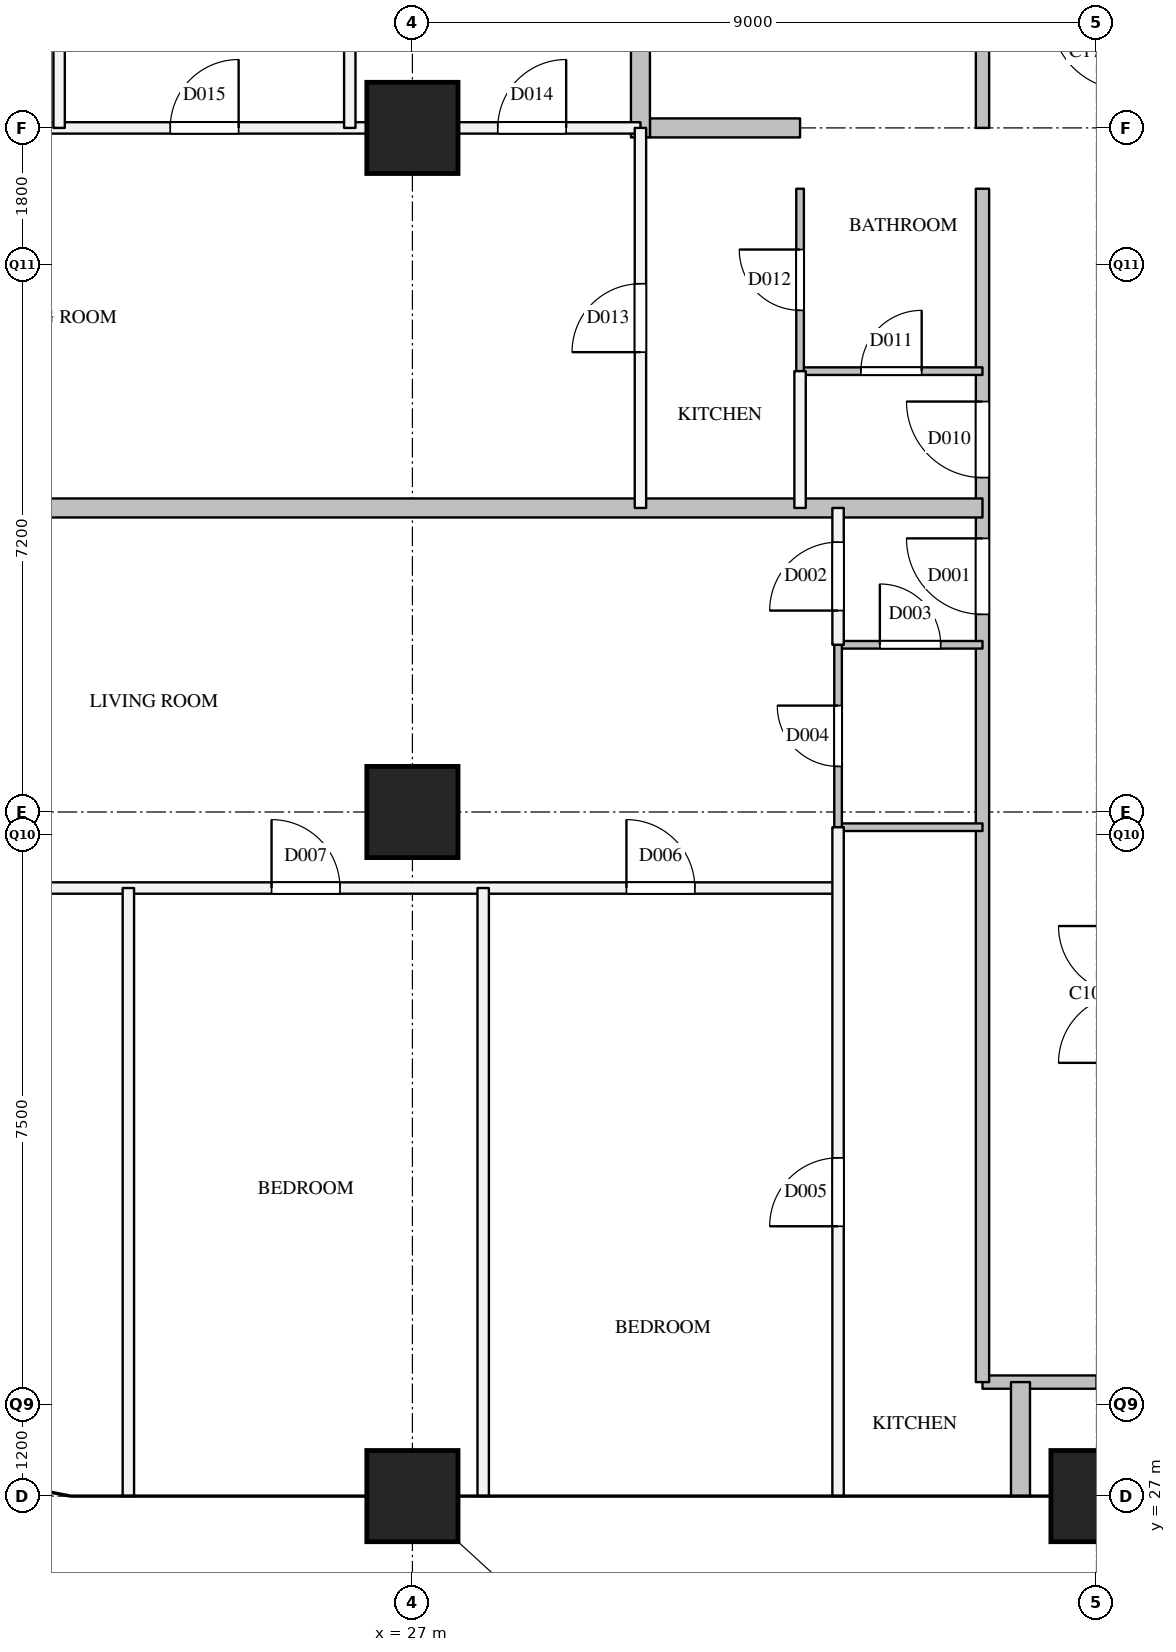
"""IFC4 building model, lengths in metres.
Left out: names, types, materials, properties, quantities, classifications, styles, units other than length and angle.
Written with IfcOpenShell. Run it as: python <this file> out.ifc"""

import sys

from ifc_helpers import new_model, si_unit, direction, frame, frame_2d, origin, origin_2d, place, context, subcontext, project, spatial, rectangle, extrude, element, fill, save


model = new_model("IFC4")
c1 = context("Model", 3, precision=1e-05, world=origin(), true_north=direction((0.0, 1.0)))
c2 = subcontext(c1, "Body", "Model", "MODEL_VIEW")
j1 = project(units=[si_unit("LENGTHUNIT", "METRE"), si_unit("PLANEANGLEUNIT", "RADIAN")], contexts=[c1])
p1 = place(None, origin())
s1 = spatial("IfcSite", under=j1, at=p1, CompositionType="ELEMENT")
p2 = place(p1, origin())
s2 = spatial("IfcBuilding", under=s1, at=p2, CompositionType="ELEMENT")
p3 = place(p2, frame((0.0, 0.0, 250.1)))
s3 = spatial("IfcBuildingStorey", under=s2, at=p3, CompositionType="ELEMENT", Elevation=250.1)
for number, where, z_axis, x_axis in (
    (1, (27.0, 27.0, 0.0), (0.0, 0.0, 1.0), (1.0, 0.0, 0.0)),
    (2, (27.0, 36.0, 0.0), (0.0, 0.0, 1.0), (1.0, 0.0, 0.0)),
    (3, (27.0, 45.0, 0.0), (0.0, 0.0, 1.0), (1.0, 0.0, 0.0)),
    (4, (36.0, 27.0, 0.0), (0.0, 0.0, 1.0), (1.0, 0.0, 0.0)),
):
    element("IfcColumn", number, at=place(p3, frame(where, z_axis=z_axis, x_axis=x_axis)), inside=s3, PredefinedType="COLUMN", context=c2, shape_type="SweptSolid", body=[
        extrude(rectangle(XDim=1.2, YDim=1.2, at=origin_2d()), origin(), (0.0, 0.0, 1.0), 3.9),
    ])
p4 = place(p3, frame((34.5, 28.5, 0.0), z_axis=(0.0, 0.0, 1.0), x_axis=(1.0, 0.0, 0.0)))
e5 = element("IfcWall", 5, at=p4, inside=s3, PredefinedType="PARTITIONING", context=c2, shape_type="SweptSolid", body=[
    extrude(rectangle(XDim=1.5, YDim=0.175, at=frame_2d((0.75, 0.0))), origin(), (0.0, 0.0, 1.0), 3.6),
])
p5 = place(p3, frame((34.5, 28.5, 0.0), z_axis=(0.0, 0.0, 1.0), x_axis=(0.0, 1.0, 0.0)))
e6 = element("IfcWall", 6, at=p5, inside=s3, PredefinedType="PARTITIONING", context=c2, shape_type="SweptSolid", body=[
    extrude(rectangle(XDim=15.7, YDim=0.175, at=frame_2d((7.85, 0.0))), origin(), (0.0, 0.0, 1.0), 3.6),
])
p6 = place(p5, frame((10.1, 0.0, 0.0)))
e7 = element("IfcOpeningElement", 7, at=p6, cuts=e6, PredefinedType="OPENING", context=c2, shape_type="SweptSolid", body=[
    extrude(rectangle(XDim=1.0, YDim=2.1, at=frame_2d((0.5, 1.05))), frame((0.0, 0.097, 0.0), z_axis=(0.0, -1.0, 0.0), x_axis=(1.0, 0.0, 0.0)), (0.0, 0.0, 1.0), 0.195),
])
p7 = place(p5, frame((11.9, 0.0, 0.0)))
e8 = element("IfcOpeningElement", 8, at=p7, cuts=e6, PredefinedType="OPENING", context=c2, shape_type="SweptSolid", body=[
    extrude(rectangle(XDim=1.0, YDim=2.1, at=frame_2d((0.5, 1.05))), frame((0.0, 0.097, 0.0), z_axis=(0.0, -1.0, 0.0), x_axis=(1.0, 0.0, 0.0)), (0.0, 0.0, 1.0), 0.195),
])
p8 = place(p3, frame((34.5, 45.0, 0.0), z_axis=(0.0, 0.0, 1.0), x_axis=(0.0, 1.0, 0.0)))
e9 = element("IfcWall", 9, at=p8, inside=s3, PredefinedType="PARTITIONING", context=c2, shape_type="SweptSolid", body=[
    extrude(rectangle(XDim=6.5, YDim=0.175, at=frame_2d((3.25, 0.0))), origin(), (0.0, 0.0, 1.0), 3.6),
])
p9 = place(p8, frame((2.8, 0.0, 0.0)))
e10 = element("IfcOpeningElement", 10, at=p9, cuts=e9, PredefinedType="OPENING", context=c2, shape_type="SweptSolid", body=[
    extrude(rectangle(XDim=0.9, YDim=2.1, at=frame_2d((0.45, 1.05))), frame((0.0, 0.097, 0.0), z_axis=(0.0, -1.0, 0.0), x_axis=(1.0, 0.0, 0.0)), (0.0, 0.0, 1.0), 0.195),
])
p10 = place(p3, frame((18.0, 35.0, 0.0), z_axis=(0.0, 0.0, 1.0), x_axis=(1.0, 0.0, 0.0)))
e11 = element("IfcWall", 11, at=p10, inside=s3, PredefinedType="PARTITIONING", context=c2, shape_type="SweptSolid", body=[
    extrude(rectangle(XDim=14.6, YDim=0.15, at=frame_2d((7.3, 0.0))), origin(), (0.0, 0.0, 1.0), 2.6),
])
p11 = place(p10, frame((11.816, 0.0, 0.0)))
e12 = element("IfcOpeningElement", 12, at=p11, cuts=e11, PredefinedType="OPENING", context=c2, shape_type="SweptSolid", body=[
    extrude(rectangle(XDim=0.9, YDim=2.1, at=frame_2d((0.45, 1.05))), frame((0.0, 0.085, 0.0), z_axis=(0.0, -1.0, 0.0), x_axis=(1.0, 0.0, 0.0)), (0.0, 0.0, 1.0), 0.17),
])
p12 = place(p10, frame((7.147, 0.0, 0.0)))
e13 = element("IfcOpeningElement", 13, at=p12, cuts=e11, PredefinedType="OPENING", context=c2, shape_type="SweptSolid", body=[
    extrude(rectangle(XDim=0.9, YDim=2.1, at=frame_2d((0.45, 1.05))), frame((0.0, 0.085, 0.0), z_axis=(0.0, -1.0, 0.0), x_axis=(1.0, 0.0, 0.0)), (0.0, 0.0, 1.0), 0.17),
])
p13 = place(p10, frame((2.181, 0.0, 0.0)))
e14 = element("IfcOpeningElement", 14, at=p13, cuts=e11, PredefinedType="OPENING", context=c2, shape_type="SweptSolid", body=[
    extrude(rectangle(XDim=0.9, YDim=2.1, at=frame_2d((0.45, 1.05))), frame((0.0, 0.085, 0.0), z_axis=(0.0, -1.0, 0.0), x_axis=(1.0, 0.0, 0.0)), (0.0, 0.0, 1.0), 0.17),
])
p14 = place(p3, frame((18.0, 45.0, 0.0), z_axis=(0.0, 0.0, 1.0), x_axis=(1.0, 0.0, 0.0)))
e15 = element("IfcWall", 15, at=p14, inside=s3, PredefinedType="PARTITIONING", context=c2, shape_type="SweptSolid", body=[
    extrude(rectangle(XDim=12.0, YDim=0.15, at=frame_2d((6.0, 0.0))), origin(), (0.0, 0.0, 1.0), 3.6),
])
p15 = place(p14, frame((10.123, 0.0, 0.0)))
e16 = element("IfcOpeningElement", 16, at=p15, cuts=e15, PredefinedType="OPENING", context=c2, shape_type="SweptSolid", body=[
    extrude(rectangle(XDim=0.9, YDim=2.1, at=frame_2d((0.45, 1.05))), frame((0.0, 0.085, 0.0), z_axis=(0.0, -1.0, 0.0), x_axis=(1.0, 0.0, 0.0)), (0.0, 0.0, 1.0), 0.17),
])
p16 = place(p14, frame((5.814, 0.0, 0.0)))
e17 = element("IfcOpeningElement", 17, at=p16, cuts=e15, PredefinedType="OPENING", context=c2, shape_type="SweptSolid", body=[
    extrude(rectangle(XDim=0.9, YDim=2.1, at=frame_2d((0.45, 1.05))), frame((0.0, 0.085, 0.0), z_axis=(0.0, -1.0, 0.0), x_axis=(1.0, 0.0, 0.0)), (0.0, 0.0, 1.0), 0.17),
])
p17 = place(p14, frame((1.726, 0.0, 0.0)))
e18 = element("IfcOpeningElement", 18, at=p17, cuts=e15, PredefinedType="OPENING", context=c2, shape_type="SweptSolid", body=[
    extrude(rectangle(XDim=0.9, YDim=2.1, at=frame_2d((0.45, 1.05))), frame((0.0, 0.085, 0.0), z_axis=(0.0, -1.0, 0.0), x_axis=(1.0, 0.0, 0.0)), (0.0, 0.0, 1.0), 0.17),
])
p18 = place(p3, frame((22.352, 45.0, 0.0), z_axis=(0.0, 0.0, 1.0), x_axis=(0.0, 1.0, 0.0)))
e19 = element("IfcWall", 19, at=p18, inside=s3, PredefinedType="PARTITIONING", context=c2, shape_type="SweptSolid", body=[
    extrude(rectangle(XDim=8.97, YDim=0.15, at=frame_2d((4.485, 0.0))), origin(), (0.0, 0.0, 1.0), 2.6),
])
p19 = place(p3, frame((23.263, 27.0, 0.0), z_axis=(0.0, 0.0, 1.0), x_axis=(0.0, 1.0, 0.0)))
e20 = element("IfcWall", 20, at=p19, inside=s3, PredefinedType="PARTITIONING", context=c2, shape_type="SweptSolid", body=[
    extrude(rectangle(XDim=8.0, YDim=0.15, at=frame_2d((4.0, 0.0))), origin(), (0.0, 0.0, 1.0), 2.6),
])
p20 = place(p3, frame((26.176, 45.0, 0.0), z_axis=(0.0, 0.0, 1.0), x_axis=(0.0, 1.0, 0.0)))
e21 = element("IfcWall", 21, at=p20, inside=s3, PredefinedType="PARTITIONING", context=c2, shape_type="SweptSolid", body=[
    extrude(rectangle(XDim=9.0, YDim=0.15, at=frame_2d((4.5, 0.0))), origin(), (0.0, 0.0, 1.0), 2.6),
])
p21 = place(p3, frame((27.931, 27.0, 0.0), z_axis=(0.0, 0.0, 1.0), x_axis=(0.0, 1.0, 0.0)))
e22 = element("IfcWall", 22, at=p21, inside=s3, PredefinedType="PARTITIONING", context=c2, shape_type="SweptSolid", body=[
    extrude(rectangle(XDim=8.0, YDim=0.15, at=frame_2d((4.0, 0.0))), origin(), (0.0, 0.0, 1.0), 2.6),
])
p22 = place(p3, frame((30.0, 40.0, 0.0), z_axis=(0.0, 0.0, 1.0), x_axis=(0.0, 1.0, 0.0)))
e23 = element("IfcWall", 23, at=p22, inside=s3, PredefinedType="PARTITIONING", context=c2, shape_type="SweptSolid", body=[
    extrude(rectangle(XDim=5.0, YDim=0.15, at=frame_2d((2.5, 0.0))), origin(), (0.0, 0.0, 1.0), 3.6),
])
p23 = place(p22, frame((2.05, 0.0, 0.0)))
e24 = element("IfcOpeningElement", 24, at=p23, cuts=e23, PredefinedType="OPENING", context=c2, shape_type="SweptSolid", body=[
    extrude(rectangle(XDim=0.9, YDim=2.1, at=frame_2d((0.45, 1.05))), frame((0.0, 0.085, 0.0), z_axis=(0.0, -1.0, 0.0), x_axis=(1.0, 0.0, 0.0)), (0.0, 0.0, 1.0), 0.17),
])
p24 = place(p3, frame((32.1, 40.0, 0.0), z_axis=(0.0, 0.0, 1.0), x_axis=(0.0, 1.0, 0.0)))
e25 = element("IfcWall", 25, at=p24, inside=s3, PredefinedType="PARTITIONING", context=c2, shape_type="SweptSolid", body=[
    extrude(rectangle(XDim=1.8, YDim=0.15, at=frame_2d((0.9, 0.0))), origin(), (0.0, 0.0, 1.0), 3.6),
])
p25 = place(p3, frame((32.6, 27.0, 0.0), z_axis=(0.0, 0.0, 1.0), x_axis=(0.0, 1.0, 0.0)))
e26 = element("IfcWall", 26, at=p25, inside=s3, PredefinedType="PARTITIONING", context=c2, shape_type="SweptSolid", body=[
    extrude(rectangle(XDim=8.8, YDim=0.15, at=frame_2d((4.4, 0.0))), origin(), (0.0, 0.0, 1.0), 2.6),
])
p26 = place(p25, frame((3.55, 0.0, 0.0)))
e27 = element("IfcOpeningElement", 27, at=p26, cuts=e26, PredefinedType="OPENING", context=c2, shape_type="SweptSolid", body=[
    extrude(rectangle(XDim=0.9, YDim=2.1, at=frame_2d((0.45, 1.05))), frame((0.0, 0.085, 0.0), z_axis=(0.0, -1.0, 0.0), x_axis=(1.0, 0.0, 0.0)), (0.0, 0.0, 1.0), 0.17),
])
p27 = place(p3, frame((32.6, 38.2, 0.0), z_axis=(0.0, 0.0, 1.0), x_axis=(0.0, 1.0, 0.0)))
e28 = element("IfcWall", 28, at=p27, inside=s3, PredefinedType="PARTITIONING", context=c2, shape_type="SweptSolid", body=[
    extrude(rectangle(XDim=1.8, YDim=0.15, at=frame_2d((0.9, 0.0))), origin(), (0.0, 0.0, 1.0), 3.6),
])
p28 = place(p27, frame((0.45, 0.0, 0.0)))
e29 = element("IfcOpeningElement", 29, at=p28, cuts=e28, PredefinedType="OPENING", context=c2, shape_type="SweptSolid", body=[
    extrude(rectangle(XDim=0.9, YDim=2.1, at=frame_2d((0.45, 1.05))), frame((0.0, 0.085, 0.0), z_axis=(0.0, -1.0, 0.0), x_axis=(1.0, 0.0, 0.0)), (0.0, 0.0, 1.0), 0.17),
])
p29 = place(p3, frame((18.0, 40.0, 0.0), z_axis=(0.0, 0.0, 1.0), x_axis=(1.0, 0.0, 0.0)))
e30 = element("IfcWall", 30, at=p29, inside=s3, PredefinedType="PARTITIONING", context=c2, shape_type="SweptSolid", body=[
    extrude(rectangle(XDim=16.5, YDim=0.25, at=frame_2d((8.25, 0.0))), origin(), (0.0, 0.0, 1.0), 2.6),
])
p30 = place(p3, frame((30.125, 45.0, 0.0), z_axis=(0.0, 0.0, 1.0), x_axis=(1.0, 0.0, 0.0)))
e31 = element("IfcWall", 31, at=p30, inside=s3, PredefinedType="PARTITIONING", context=c2, shape_type="SweptSolid", body=[
    extrude(rectangle(XDim=1.975, YDim=0.25, at=frame_2d((0.988, 0.0))), origin(), (0.0, 0.0, 1.0), 3.6),
])
p31 = place(p3, frame((30.0, 44.875, 0.0), z_axis=(0.0, 0.0, 1.0), x_axis=(0.0, 1.0, 0.0)))
e32 = element("IfcWall", 32, at=p31, inside=s3, PredefinedType="PARTITIONING", context=c2, shape_type="SweptSolid", body=[
    extrude(rectangle(XDim=9.125, YDim=0.25, at=frame_2d((4.562, 0.0))), origin(), (0.0, 0.0, 1.0), 2.6),
])
p32 = place(p3, frame((35.0, 27.0, 0.0), z_axis=(0.0, 0.0, 1.0), x_axis=(0.0, 1.0, 0.0)))
e33 = element("IfcWall", 33, at=p32, inside=s3, PredefinedType="PARTITIONING", context=c2, shape_type="SweptSolid", body=[
    extrude(rectangle(XDim=1.5, YDim=0.25, at=frame_2d((0.75, 0.0))), origin(), (0.0, 0.0, 1.0), 2.6),
])
p33 = place(p3, frame((32.6, 35.8, 0.0), z_axis=(0.0, 0.0, 1.0), x_axis=(1.0, 0.0, 0.0)))
e34 = element("IfcWall", 34, at=p33, inside=s3, PredefinedType="PARTITIONING", context=c2, shape_type="SweptSolid", body=[
    extrude(rectangle(XDim=1.9, YDim=0.1, at=frame_2d((0.95, 0.0))), origin(), (0.0, 0.0, 1.0), 3.6),
])
p34 = place(p3, frame((32.6, 38.2, 0.0), z_axis=(0.0, 0.0, 1.0), x_axis=(1.0, 0.0, 0.0)))
e35 = element("IfcWall", 35, at=p34, inside=s3, PredefinedType="PARTITIONING", context=c2, shape_type="SweptSolid", body=[
    extrude(rectangle(XDim=1.9, YDim=0.1, at=frame_2d((0.95, 0.0))), origin(), (0.0, 0.0, 1.0), 3.6),
])
p35 = place(p34, frame((0.55, 0.0, 0.0)))
e36 = element("IfcOpeningElement", 36, at=p35, cuts=e35, PredefinedType="OPENING", context=c2, shape_type="SweptSolid", body=[
    extrude(rectangle(XDim=0.8, YDim=2.1, at=frame_2d((0.4, 1.05))), frame((0.0, 0.06, 0.0), z_axis=(0.0, -1.0, 0.0), x_axis=(1.0, 0.0, 0.0)), (0.0, 0.0, 1.0), 0.12),
])
p36 = place(p3, frame((32.1, 41.8, 0.0), z_axis=(0.0, 0.0, 1.0), x_axis=(1.0, 0.0, 0.0)))
e37 = element("IfcWall", 37, at=p36, inside=s3, PredefinedType="PARTITIONING", context=c2, shape_type="SweptSolid", body=[
    extrude(rectangle(XDim=2.4, YDim=0.1, at=frame_2d((1.2, 0.0))), origin(), (0.0, 0.0, 1.0), 3.6),
])
p37 = place(p36, frame((0.8, 0.0, 0.0)))
e38 = element("IfcOpeningElement", 38, at=p37, cuts=e37, PredefinedType="OPENING", context=c2, shape_type="SweptSolid", body=[
    extrude(rectangle(XDim=0.8, YDim=2.1, at=frame_2d((0.4, 1.05))), frame((0.0, 0.06, 0.0), z_axis=(0.0, -1.0, 0.0), x_axis=(1.0, 0.0, 0.0)), (0.0, 0.0, 1.0), 0.12),
])
p38 = place(p3, frame((32.1, 41.8, 0.0), z_axis=(0.0, 0.0, 1.0), x_axis=(0.0, 1.0, 0.0)))
e39 = element("IfcWall", 39, at=p38, inside=s3, PredefinedType="PARTITIONING", context=c2, shape_type="SweptSolid", body=[
    extrude(rectangle(XDim=2.4, YDim=0.1, at=frame_2d((1.2, 0.0))), origin(), (0.0, 0.0, 1.0), 3.6),
])
p39 = place(p38, frame((0.8, 0.0, 0.0)))
e40 = element("IfcOpeningElement", 40, at=p39, cuts=e39, PredefinedType="OPENING", context=c2, shape_type="SweptSolid", body=[
    extrude(rectangle(XDim=0.8, YDim=2.1, at=frame_2d((0.4, 1.05))), frame((0.0, 0.06, 0.0), z_axis=(0.0, -1.0, 0.0), x_axis=(1.0, 0.0, 0.0)), (0.0, 0.0, 1.0), 0.12),
])
p40 = place(p3, frame((32.6, 35.8, 0.0), z_axis=(0.0, 0.0, 1.0), x_axis=(0.0, 1.0, 0.0)))
e41 = element("IfcWall", 41, at=p40, inside=s3, PredefinedType="PARTITIONING", context=c2, shape_type="SweptSolid", body=[
    extrude(rectangle(XDim=2.4, YDim=0.1, at=frame_2d((1.2, 0.0))), origin(), (0.0, 0.0, 1.0), 3.6),
])
p41 = place(p40, frame((0.8, 0.0, 0.0)))
e42 = element("IfcOpeningElement", 42, at=p41, cuts=e41, PredefinedType="OPENING", context=c2, shape_type="SweptSolid", body=[
    extrude(rectangle(XDim=0.8, YDim=2.1, at=frame_2d((0.4, 1.05))), frame((0.0, 0.06, 0.0), z_axis=(0.0, -1.0, 0.0), x_axis=(1.0, 0.0, 0.0)), (0.0, 0.0, 1.0), 0.12),
])
p42 = place(p6, origin())
e43 = element("IfcDoor", 43, at=p42, inside=s3, OperationType="SINGLE_SWING_RIGHT", PredefinedType="DOOR", context=c2, shape_type="SweptSolid", body=[
    extrude(rectangle(XDim=1.0, YDim=2.1, at=frame_2d((0.5, 1.05))), frame((0.0, 0.025, 0.0), z_axis=(0.0, -1.0, 0.0), x_axis=(1.0, 0.0, 0.0)), (0.0, 0.0, 1.0), 0.05),
])
fill(e7, e43)
p43 = place(p28, origin())
e44 = element("IfcDoor", 44, at=p43, inside=s3, OperationType="SINGLE_SWING_LEFT", PredefinedType="DOOR", context=c2, shape_type="SweptSolid", body=[
    extrude(rectangle(XDim=0.9, YDim=2.1, at=frame_2d((0.45, 1.05))), frame((0.0, 0.025, 0.0), z_axis=(0.0, -1.0, 0.0), x_axis=(1.0, 0.0, 0.0)), (0.0, 0.0, 1.0), 0.05),
])
fill(e29, e44)
p44 = place(p35, origin())
e45 = element("IfcDoor", 45, at=p44, inside=s3, OperationType="SINGLE_SWING_LEFT", PredefinedType="DOOR", context=c2, shape_type="SweptSolid", body=[
    extrude(rectangle(XDim=0.8, YDim=2.1, at=frame_2d((0.4, 1.05))), frame((0.0, 0.025, 0.0), z_axis=(0.0, -1.0, 0.0), x_axis=(1.0, 0.0, 0.0)), (0.0, 0.0, 1.0), 0.05),
])
fill(e36, e45)
p45 = place(p41, origin())
e46 = element("IfcDoor", 46, at=p45, inside=s3, OperationType="SINGLE_SWING_RIGHT", PredefinedType="DOOR", context=c2, shape_type="SweptSolid", body=[
    extrude(rectangle(XDim=0.8, YDim=2.1, at=frame_2d((0.4, 1.05))), frame((0.0, 0.025, 0.0), z_axis=(0.0, -1.0, 0.0), x_axis=(1.0, 0.0, 0.0)), (0.0, 0.0, 1.0), 0.05),
])
fill(e42, e46)
p46 = place(p26, origin())
e47 = element("IfcDoor", 47, at=p46, inside=s3, OperationType="SINGLE_SWING_LEFT", PredefinedType="DOOR", context=c2, shape_type="SweptSolid", body=[
    extrude(rectangle(XDim=0.9, YDim=2.1, at=frame_2d((0.45, 1.05))), frame((0.0, 0.025, 0.0), z_axis=(0.0, -1.0, 0.0), x_axis=(1.0, 0.0, 0.0)), (0.0, 0.0, 1.0), 0.05),
])
fill(e27, e47)
p47 = place(p11, origin())
e48 = element("IfcDoor", 48, at=p47, inside=s3, OperationType="SINGLE_SWING_LEFT", PredefinedType="DOOR", context=c2, shape_type="SweptSolid", body=[
    extrude(rectangle(XDim=0.9, YDim=2.1, at=frame_2d((0.45, 1.05))), frame((0.0, 0.025, 0.0), z_axis=(0.0, -1.0, 0.0), x_axis=(1.0, 0.0, 0.0)), (0.0, 0.0, 1.0), 0.05),
])
fill(e12, e48)
p48 = place(p12, origin())
e49 = element("IfcDoor", 49, at=p48, inside=s3, OperationType="SINGLE_SWING_LEFT", PredefinedType="DOOR", context=c2, shape_type="SweptSolid", body=[
    extrude(rectangle(XDim=0.9, YDim=2.1, at=frame_2d((0.45, 1.05))), frame((0.0, 0.025, 0.0), z_axis=(0.0, -1.0, 0.0), x_axis=(1.0, 0.0, 0.0)), (0.0, 0.0, 1.0), 0.05),
])
fill(e13, e49)
p49 = place(p7, origin())
e50 = element("IfcDoor", 50, at=p49, inside=s3, OperationType="SINGLE_SWING_RIGHT", PredefinedType="DOOR", context=c2, shape_type="SweptSolid", body=[
    extrude(rectangle(XDim=1.0, YDim=2.1, at=frame_2d((0.5, 1.05))), frame((0.0, 0.025, 0.0), z_axis=(0.0, -1.0, 0.0), x_axis=(1.0, 0.0, 0.0)), (0.0, 0.0, 1.0), 0.05),
])
fill(e8, e50)
p50 = place(p37, origin())
e51 = element("IfcDoor", 51, at=p50, inside=s3, OperationType="SINGLE_SWING_RIGHT", PredefinedType="DOOR", context=c2, shape_type="SweptSolid", body=[
    extrude(rectangle(XDim=0.8, YDim=2.1, at=frame_2d((0.4, 1.05))), frame((0.0, 0.025, 0.0), z_axis=(0.0, -1.0, 0.0), x_axis=(1.0, 0.0, 0.0)), (0.0, 0.0, 1.0), 0.05),
])
fill(e38, e51)
p51 = place(p39, origin())
e52 = element("IfcDoor", 52, at=p51, inside=s3, OperationType="SINGLE_SWING_RIGHT", PredefinedType="DOOR", context=c2, shape_type="SweptSolid", body=[
    extrude(rectangle(XDim=0.8, YDim=2.1, at=frame_2d((0.4, 1.05))), frame((0.0, 0.025, 0.0), z_axis=(0.0, -1.0, 0.0), x_axis=(1.0, 0.0, 0.0)), (0.0, 0.0, 1.0), 0.05),
])
fill(e40, e52)
p52 = place(p23, origin())
e53 = element("IfcDoor", 53, at=p52, inside=s3, OperationType="SINGLE_SWING_LEFT", PredefinedType="DOOR", context=c2, shape_type="SweptSolid", body=[
    extrude(rectangle(XDim=0.9, YDim=2.1, at=frame_2d((0.45, 1.05))), frame((0.0, 0.025, 0.0), z_axis=(0.0, -1.0, 0.0), x_axis=(1.0, 0.0, 0.0)), (0.0, 0.0, 1.0), 0.05),
])
fill(e24, e53)
p53 = place(p15, origin())
e54 = element("IfcDoor", 54, at=p53, inside=s3, OperationType="SINGLE_SWING_RIGHT", PredefinedType="DOOR", context=c2, shape_type="SweptSolid", body=[
    extrude(rectangle(XDim=0.9, YDim=2.1, at=frame_2d((0.45, 1.05))), frame((0.0, 0.025, 0.0), z_axis=(0.0, -1.0, 0.0), x_axis=(1.0, 0.0, 0.0)), (0.0, 0.0, 1.0), 0.05),
])
fill(e16, e54)
p54 = place(p16, origin())
e55 = element("IfcDoor", 55, at=p54, inside=s3, OperationType="SINGLE_SWING_RIGHT", PredefinedType="DOOR", context=c2, shape_type="SweptSolid", body=[
    extrude(rectangle(XDim=0.9, YDim=2.1, at=frame_2d((0.45, 1.05))), frame((0.0, 0.025, 0.0), z_axis=(0.0, -1.0, 0.0), x_axis=(1.0, 0.0, 0.0)), (0.0, 0.0, 1.0), 0.05),
])
fill(e17, e55)
save(model, sys.argv[1])
